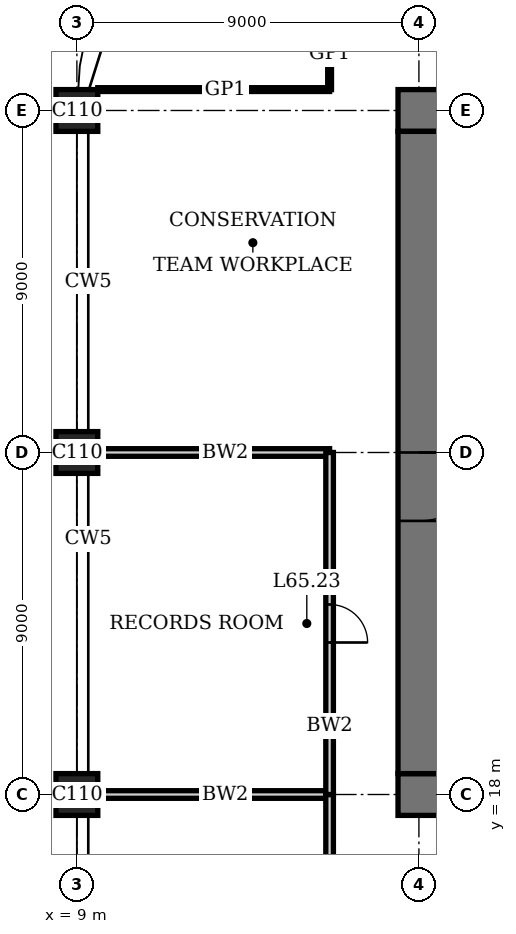
"""IFC4 building model, lengths in metres.
Left out: names, types, materials, properties, quantities, classifications, styles, units other than length and angle.
Written with IfcOpenShell. Run it as: python <this file> out.ifc"""

import sys

from ifc_helpers import new_model, si_unit, direction, frame, frame_2d, origin, origin_2d, place, context, subcontext, project, spatial, rectangle, extrude, element, fill, save


model = new_model("IFC4")
c1 = context("Model", 3, precision=1e-05, world=origin(), true_north=direction((0.0, 1.0)))
c2 = subcontext(c1, "Body", "Model", "MODEL_VIEW")
j1 = project(units=[si_unit("LENGTHUNIT", "METRE"), si_unit("PLANEANGLEUNIT", "RADIAN")], contexts=[c1])
p1 = place(None, origin())
s1 = spatial("IfcSite", under=j1, at=p1, CompositionType="ELEMENT")
p2 = place(p1, origin())
s2 = spatial("IfcBuilding", under=s1, at=p2, CompositionType="ELEMENT")
p3 = place(p2, frame((0.0, 0.0, 267.4)))
s3 = spatial("IfcBuildingStorey", under=s2, at=p3, CompositionType="ELEMENT", Elevation=267.4)
for number, where, z_axis, x_axis in (
    (1, (9.0, 18.0, 0.0), (0.0, 0.0, 1.0), (1.0, 0.0, 0.0)),
    (2, (9.0, 27.0, 0.0), (0.0, 0.0, 1.0), (1.0, 0.0, 0.0)),
    (3, (9.0, 36.0, 0.0), (0.0, 0.0, 1.0), (1.0, 0.0, 0.0)),
):
    element("IfcColumn", number, at=place(p3, frame(where, z_axis=z_axis, x_axis=x_axis)), inside=s3, PredefinedType="COLUMN", context=c2, shape_type="SweptSolid", body=[
        extrude(rectangle(XDim=1.1, YDim=1.1, at=origin_2d()), origin(), (0.0, 0.0, 1.0), 4.0),
    ])
p4 = place(p3, frame((17.45, 18.0, 0.0), z_axis=(0.0, 0.0, 1.0), x_axis=(1.0, 0.0, 0.0)))
e4 = element("IfcWall", 4, at=p4, inside=s3, PredefinedType="SHEAR", context=c2, shape_type="SweptSolid", body=[
    extrude(rectangle(XDim=28.1, YDim=1.1, at=frame_2d((14.05, 0.0))), origin(), (0.0, 0.0, 1.0), 4.0),
])
p5 = place(p4, frame((11.55, 0.0, 0.0)))
e5 = element("IfcOpeningElement", 5, at=p5, cuts=e4, PredefinedType="OPENING", context=c2, shape_type="SweptSolid", body=[
    extrude(rectangle(XDim=1.0, YDim=2.4, at=frame_2d((0.5, 1.2))), frame((0.0, 0.56, 0.0), z_axis=(0.0, -1.0, 0.0), x_axis=(1.0, 0.0, 0.0)), (0.0, 0.0, 1.0), 1.12),
])
p6 = place(p4, frame((16.55, 0.0, 0.0)))
e6 = element("IfcOpeningElement", 6, at=p6, cuts=e4, PredefinedType="OPENING", context=c2, shape_type="SweptSolid", body=[
    extrude(rectangle(XDim=1.0, YDim=2.4, at=frame_2d((0.5, 1.2))), frame((0.0, 0.56, 0.0), z_axis=(0.0, -1.0, 0.0), x_axis=(1.0, 0.0, 0.0)), (0.0, 0.0, 1.0), 1.12),
])
p7 = place(p4, frame((20.0, 0.0, 0.0)))
e7 = element("IfcOpeningElement", 7, at=p7, cuts=e4, PredefinedType="OPENING", context=c2, shape_type="SweptSolid", body=[
    extrude(rectangle(XDim=1.1, YDim=2.4, at=frame_2d((0.55, 1.2))), frame((0.0, 0.56, 0.0), z_axis=(0.0, -1.0, 0.0), x_axis=(1.0, 0.0, 0.0)), (0.0, 0.0, 1.0), 1.12),
])
p8 = place(p4, frame((24.05, 0.0, 0.0)))
e8 = element("IfcOpeningElement", 8, at=p8, cuts=e4, PredefinedType="OPENING", context=c2, shape_type="SweptSolid", body=[
    extrude(rectangle(XDim=1.0, YDim=2.4, at=frame_2d((0.5, 1.2))), frame((0.0, 0.56, 0.0), z_axis=(0.0, -1.0, 0.0), x_axis=(1.0, 0.0, 0.0)), (0.0, 0.0, 1.0), 1.12),
])
p9 = place(p3, frame((45.55, 36.0, 0.0), z_axis=(0.0, 0.0, 1.0), x_axis=(-1.0, 0.0, 0.0)))
e9 = element("IfcWall", 9, at=p9, inside=s3, PredefinedType="SHEAR", context=c2, shape_type="SweptSolid", body=[
    extrude(rectangle(XDim=28.1, YDim=1.1, at=frame_2d((14.05, 0.0))), origin(), (0.0, 0.0, 1.0), 4.0),
])
p10 = place(p9, frame((11.55, 0.0, 0.0)))
e10 = element("IfcOpeningElement", 10, at=p10, cuts=e9, PredefinedType="OPENING", context=c2, shape_type="SweptSolid", body=[
    extrude(rectangle(XDim=1.0, YDim=2.4, at=frame_2d((0.5, 1.2))), frame((0.0, 0.56, 0.0), z_axis=(0.0, -1.0, 0.0), x_axis=(1.0, 0.0, 0.0)), (0.0, 0.0, 1.0), 1.12),
])
p11 = place(p9, frame((16.55, 0.0, 0.0)))
e11 = element("IfcOpeningElement", 11, at=p11, cuts=e9, PredefinedType="OPENING", context=c2, shape_type="SweptSolid", body=[
    extrude(rectangle(XDim=1.0, YDim=2.4, at=frame_2d((0.5, 1.2))), frame((0.0, 0.56, 0.0), z_axis=(0.0, -1.0, 0.0), x_axis=(1.0, 0.0, 0.0)), (0.0, 0.0, 1.0), 1.12),
])
p12 = place(p9, frame((20.0, 0.0, 0.0)))
e12 = element("IfcOpeningElement", 12, at=p12, cuts=e9, PredefinedType="OPENING", context=c2, shape_type="SweptSolid", body=[
    extrude(rectangle(XDim=1.1, YDim=2.4, at=frame_2d((0.55, 1.2))), frame((0.0, 0.56, 0.0), z_axis=(0.0, -1.0, 0.0), x_axis=(1.0, 0.0, 0.0)), (0.0, 0.0, 1.0), 1.12),
])
p13 = place(p9, frame((24.05, 0.0, 0.0)))
e13 = element("IfcOpeningElement", 13, at=p13, cuts=e9, PredefinedType="OPENING", context=c2, shape_type="SweptSolid", body=[
    extrude(rectangle(XDim=1.0, YDim=2.4, at=frame_2d((0.5, 1.2))), frame((0.0, 0.56, 0.0), z_axis=(0.0, -1.0, 0.0), x_axis=(1.0, 0.0, 0.0)), (0.0, 0.0, 1.0), 1.12),
])
p14 = place(p3, frame((18.0, 35.45, 0.0), z_axis=(0.0, 0.0, 1.0), x_axis=(0.0, -1.0, 0.0)))
e14 = element("IfcWall", 14, at=p14, inside=s3, PredefinedType="SHEAR", context=c2, shape_type="SweptSolid", body=[
    extrude(rectangle(XDim=16.9, YDim=1.1, at=frame_2d((8.45, 0.0))), origin(), (0.0, 0.0, 1.0), 4.0),
])
p15 = place(p14, frame((8.45, 0.0, 0.0)))
e15 = element("IfcOpeningElement", 15, at=p15, cuts=e14, PredefinedType="OPENING", context=c2, shape_type="SweptSolid", body=[
    extrude(rectangle(XDim=1.8, YDim=2.4, at=frame_2d((0.9, 1.2))), frame((0.0, 0.56, 0.0), z_axis=(0.0, -1.0, 0.0), x_axis=(1.0, 0.0, 0.0)), (0.0, 0.0, 1.0), 1.12),
])
for number, where, z_axis, x_axis in (
    (16, (9.55, 18.0, 0.0), (0.0, 0.0, 1.0), (1.0, 0.0, 0.0)),
    (17, (9.55, 27.0, 0.0), (0.0, 0.0, 1.0), (1.0, 0.0, 0.0)),
):
    element("IfcWall", number, at=place(p3, frame(where, z_axis=z_axis, x_axis=x_axis)), inside=s3, PredefinedType="SOLIDWALL", context=c2, shape_type="SweptSolid", body=[
        extrude(rectangle(XDim=6.1, YDim=0.2, at=frame_2d((3.05, 0.0))), origin(), (0.0, 0.0, 1.0), 3.05),
    ])
p16 = place(p3, frame((9.55, 36.55, 0.0), z_axis=(0.0, 0.0, 1.0), x_axis=(1.0, 0.0, 0.0)))
e18 = element("IfcWall", 18, at=p16, inside=s3, PredefinedType="PARTITIONING", context=c2, shape_type="SweptSolid", body=[
    extrude(rectangle(XDim=6.1, YDim=0.1, at=frame_2d((3.05, 0.0))), origin(), (0.0, 0.0, 1.0), 3.75),
])
p17 = place(p3, frame((15.65, 9.0, 0.0), z_axis=(0.0, 0.0, 1.0), x_axis=(0.0, 1.0, 0.0)))
e19 = element("IfcWall", 19, at=p17, inside=s3, PredefinedType="SOLIDWALL", context=c2, shape_type="SweptSolid", body=[
    extrude(rectangle(XDim=9.0, YDim=0.2, at=frame_2d((4.5, 0.0))), origin(), (0.0, 0.0, 1.0), 3.75),
])
p18 = place(p17, frame((4.0, 0.0, 0.0)))
e20 = element("IfcOpeningElement", 20, at=p18, cuts=e19, PredefinedType="OPENING", context=c2, shape_type="SweptSolid", body=[
    extrude(rectangle(XDim=1.0, YDim=2.4, at=frame_2d((0.5, 1.2))), frame((0.0, 0.11, 0.0), z_axis=(0.0, -1.0, 0.0), x_axis=(1.0, 0.0, 0.0)), (0.0, 0.0, 1.0), 0.22),
])
p19 = place(p3, frame((15.65, 18.0, 0.0), z_axis=(0.0, 0.0, 1.0), x_axis=(0.0, 1.0, 0.0)))
e21 = element("IfcWall", 21, at=p19, inside=s3, PredefinedType="SOLIDWALL", context=c2, shape_type="SweptSolid", body=[
    extrude(rectangle(XDim=9.0, YDim=0.2, at=frame_2d((4.5, 0.0))), origin(), (0.0, 0.0, 1.0), 3.75),
])
p20 = place(p19, frame((4.0, 0.0, 0.0)))
e22 = element("IfcOpeningElement", 22, at=p20, cuts=e21, PredefinedType="OPENING", context=c2, shape_type="SweptSolid", body=[
    extrude(rectangle(XDim=1.0, YDim=2.4, at=frame_2d((0.5, 1.2))), frame((0.0, 0.11, 0.0), z_axis=(0.0, -1.0, 0.0), x_axis=(1.0, 0.0, 0.0)), (0.0, 0.0, 1.0), 0.22),
])
p21 = place(p3, frame((15.65, 36.55, 0.0), z_axis=(0.0, 0.0, 1.0), x_axis=(0.0, 1.0, 0.0)))
e23 = element("IfcWall", 23, at=p21, inside=s3, PredefinedType="PARTITIONING", context=c2, shape_type="SweptSolid", body=[
    extrude(rectangle(XDim=1.85, YDim=0.1, at=frame_2d((0.925, 0.0))), origin(), (0.0, 0.0, 1.0), 3.75),
])
p22 = place(p15, origin())
e24 = element("IfcDoor", 24, at=p22, inside=s3, OperationType="DOUBLE_DOOR_DOUBLE_SWING", PredefinedType="DOOR", context=c2, shape_type="SweptSolid", body=[
    extrude(rectangle(XDim=1.8, YDim=2.4, at=frame_2d((0.9, 1.2))), frame((0.0, 0.03, 0.0), z_axis=(0.0, -1.0, 0.0), x_axis=(1.0, 0.0, 0.0)), (0.0, 0.0, 1.0), 0.06),
    extrude(rectangle(XDim=0.04, YDim=2.4, at=frame_2d((0.02, 1.2))), frame((0.0, 0.55, 0.0), z_axis=(0.0, -1.0, 0.0), x_axis=(1.0, 0.0, 0.0)), (0.0, 0.0, 1.0), 1.1),
    extrude(rectangle(XDim=0.04, YDim=2.4, at=frame_2d((1.78, 1.2))), frame((0.0, 0.55, 0.0), z_axis=(0.0, -1.0, 0.0), x_axis=(1.0, 0.0, 0.0)), (0.0, 0.0, 1.0), 1.1),
    extrude(rectangle(XDim=1.8, YDim=0.04, at=frame_2d((0.9, 2.38))), frame((0.0, 0.55, 0.0), z_axis=(0.0, -1.0, 0.0), x_axis=(1.0, 0.0, 0.0)), (0.0, 0.0, 1.0), 1.1),
])
fill(e15, e24)
p23 = place(p20, origin())
e25 = element("IfcDoor", 25, at=p23, inside=s3, OperationType="SINGLE_SWING_LEFT", PredefinedType="DOOR", context=c2, shape_type="SweptSolid", body=[
    extrude(rectangle(XDim=1.0, YDim=2.4, at=frame_2d((0.5, 1.2))), frame((0.0, 0.035, 0.0), z_axis=(0.0, -1.0, 0.0), x_axis=(1.0, 0.0, 0.0)), (0.0, 0.0, 1.0), 0.07),
])
fill(e22, e25)
save(model, sys.argv[1])
